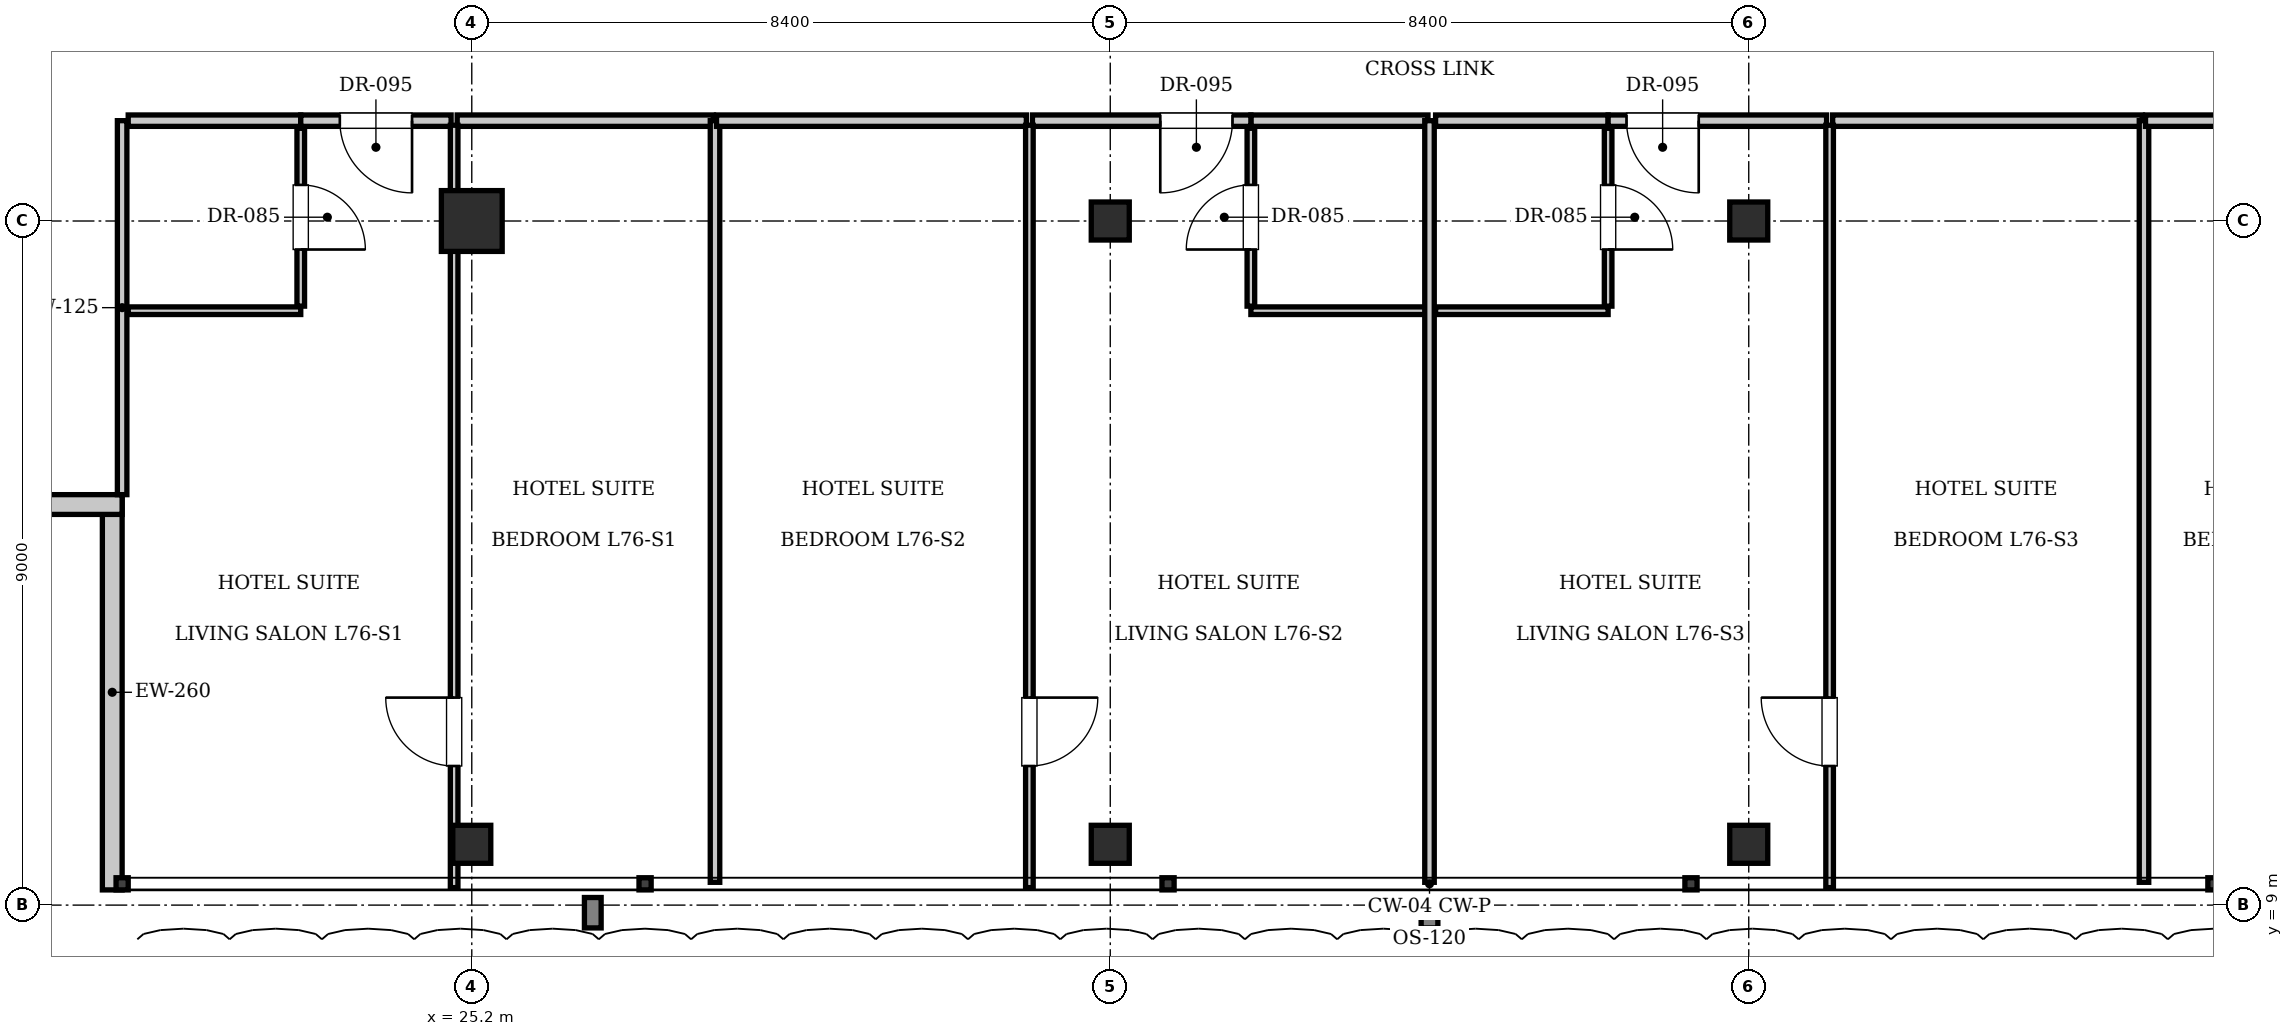
"""IFC4 building model, lengths in metres.
Left out: names, types, materials, properties, quantities, classifications, styles, units other than length and angle.
Written with IfcOpenShell. Run it as: python <this file> out.ifc"""

import sys

from ifc_helpers import new_model, si_unit, direction, frame, frame_2d, origin, origin_2d, place, context, subcontext, project, spatial, rectangle, i_section, extrude, element, fill, save


model = new_model("IFC4")
c1 = context("Model", 3, precision=1e-05, world=origin(), true_north=direction((0.0, 1.0)))
c2 = subcontext(c1, "Body", "Model", "MODEL_VIEW")
j1 = project(units=[si_unit("LENGTHUNIT", "METRE"), si_unit("PLANEANGLEUNIT", "RADIAN")], contexts=[c1])
p1 = place(None, origin())
s1 = spatial("IfcSite", under=j1, at=p1, CompositionType="ELEMENT")
p2 = place(p1, origin())
s2 = spatial("IfcBuilding", under=s1, at=p2, CompositionType="ELEMENT")
p3 = place(p2, frame((0.0, 0.0, 308.7)))
s3 = spatial("IfcBuildingStorey", under=s2, at=p3, CompositionType="ELEMENT", Elevation=308.7)
p4 = place(p3, frame((25.2, 18.0, 0.0), z_axis=(0.0, 0.0, 1.0), x_axis=(1.0, 0.0, 0.0)))
e1 = element("IfcColumn", 1, at=p4, inside=s3, PredefinedType="COLUMN", context=c2, shape_type="SweptSolid", body=[
    extrude(rectangle(XDim=0.8, YDim=0.8, at=origin_2d()), origin(), (0.0, 0.0, 1.0), 3.85),
])
for number, where, z_axis, x_axis in (
    (2, (33.6, 18.0, 0.0), (0.0, 0.0, 1.0), (1.0, 0.0, 0.0)),
    (3, (42.0, 18.0, 0.0), (0.0, 0.0, 1.0), (1.0, 0.0, 0.0)),
    (4, (25.2, 9.8, 0.0), (0.0, 0.0, 1.0), (1.0, 0.0, 0.0)),
    (5, (33.6, 9.8, 0.0), (0.0, 0.0, 1.0), (1.0, 0.0, 0.0)),
    (6, (42.0, 9.8, 0.0), (0.0, 0.0, 1.0), (1.0, 0.0, 0.0)),
):
    element("IfcColumn", number, at=place(p3, frame(where, z_axis=z_axis, x_axis=x_axis)), inside=s3, PredefinedType="COLUMN", context=c2, shape_type="SweptSolid", body=[
        extrude(i_section(OverallWidth=0.5, OverallDepth=0.5, WebThickness=0.022, FlangeThickness=0.032, at=origin_2d()), origin(), (0.0, 0.0, 1.0), 3.85),
    ])
p5 = place(p3, frame((20.47, 9.2, 0.0), z_axis=(0.0, 0.0, 1.0), x_axis=(0.0, 1.0, 0.0)))
e7 = element("IfcWall", 7, at=p5, inside=s3, PredefinedType="SOLIDWALL", context=c2, shape_type="SweptSolid", body=[
    extrude(rectangle(XDim=5.2, YDim=0.26, at=frame_2d((2.6, 0.0))), origin(), (0.0, 0.0, 1.0), 3.61),
])
p6 = place(p3, frame((20.6, 14.27, 0.0), z_axis=(0.0, 0.0, 1.0), x_axis=(-1.0, 0.0, 0.0)))
e8 = element("IfcWall", 8, at=p6, inside=s3, PredefinedType="SOLIDWALL", context=c2, shape_type="SweptSolid", body=[
    extrude(rectangle(XDim=5.2, YDim=0.26, at=frame_2d((2.6, 0.0))), origin(), (0.0, 0.0, 1.0), 3.61),
])
p7 = place(p6, frame((1.6, 0.0, 0.9)))
e9 = element("IfcOpeningElement", 9, at=p7, cuts=e8, PredefinedType="OPENING", context=c2, shape_type="SweptSolid", body=[
    extrude(rectangle(XDim=2.0, YDim=2.2, at=frame_2d((1.0, 1.1))), frame((0.0, 0.14, 0.0), z_axis=(0.0, -1.0, 0.0), x_axis=(1.0, 0.0, 0.0)), (0.0, 0.0, 1.0), 0.28),
])
p8 = place(p3, frame((20.6, 14.4, 0.0), z_axis=(0.0, 0.0, 1.0), x_axis=(0.0, 1.0, 0.0)))
e10 = element("IfcWall", 10, at=p8, inside=s3, PredefinedType="PARTITIONING", context=c2, shape_type="SweptSolid", body=[
    extrude(rectangle(XDim=4.92, YDim=0.125, at=frame_2d((2.46, 0.0))), origin(), (0.0, 0.0, 1.0), 3.61),
])
p9 = place(p3, frame((20.68, 19.32, 0.0), z_axis=(0.0, 0.0, 1.0), x_axis=(1.0, 0.0, 0.0)))
e11 = element("IfcWall", 11, at=p9, inside=s3, PredefinedType="PARTITIONING", context=c2, shape_type="SweptSolid", body=[
    extrude(rectangle(XDim=2.27, YDim=0.15, at=frame_2d((1.135, 0.0))), origin(), (0.0, 0.0, 1.0), 3.61),
])
p10 = place(p3, frame((20.68, 16.82, 0.0), z_axis=(0.0, 0.0, 1.0), x_axis=(1.0, 0.0, 0.0)))
e12 = element("IfcWall", 12, at=p10, inside=s3, PredefinedType="PARTITIONING", context=c2, shape_type="SweptSolid", body=[
    extrude(rectangle(XDim=2.27, YDim=0.1, at=frame_2d((1.135, 0.0))), origin(), (0.0, 0.0, 1.0), 3.61),
])
p11 = place(p3, frame((22.95, 16.88, 0.0), z_axis=(0.0, 0.0, 1.0), x_axis=(0.0, 1.0, 0.0)))
e13 = element("IfcWall", 13, at=p11, inside=s3, PredefinedType="PARTITIONING", context=c2, shape_type="SweptSolid", body=[
    extrude(rectangle(XDim=2.34, YDim=0.1, at=frame_2d((1.17, 0.0))), origin(), (0.0, 0.0, 1.0), 3.61),
])
p12 = place(p11, frame((0.745, 0.0, 0.0)))
e14 = element("IfcOpeningElement", 14, at=p12, cuts=e13, PredefinedType="OPENING", context=c2, shape_type="SweptSolid", body=[
    extrude(rectangle(XDim=0.85, YDim=2.1, at=frame_2d((0.425, 1.05))), frame((0.0, 0.06, 0.0), z_axis=(0.0, -1.0, 0.0), x_axis=(1.0, 0.0, 0.0)), (0.0, 0.0, 1.0), 0.12),
])
p13 = place(p3, frame((22.95, 19.32, 0.0), z_axis=(0.0, 0.0, 1.0), x_axis=(1.0, 0.0, 0.0)))
e15 = element("IfcWall", 15, at=p13, inside=s3, PredefinedType="PARTITIONING", context=c2, shape_type="SweptSolid", body=[
    extrude(rectangle(XDim=1.978, YDim=0.15, at=frame_2d((0.989, 0.0))), origin(), (0.0, 0.0, 1.0), 3.61),
])
p14 = place(p13, frame((0.514, 0.0, 0.0)))
e16 = element("IfcOpeningElement", 16, at=p14, cuts=e15, PredefinedType="OPENING", context=c2, shape_type="SweptSolid", body=[
    extrude(rectangle(XDim=0.95, YDim=2.15, at=frame_2d((0.475, 1.075))), frame((0.0, 0.085, 0.0), z_axis=(0.0, -1.0, 0.0), x_axis=(1.0, 0.0, 0.0)), (0.0, 0.0, 1.0), 0.17),
])
p15 = place(p3, frame((25.008, 19.32, 0.0), z_axis=(0.0, 0.0, 1.0), x_axis=(1.0, 0.0, 0.0)))
e17 = element("IfcWall", 17, at=p15, inside=s3, PredefinedType="PARTITIONING", context=c2, shape_type="SweptSolid", body=[
    extrude(rectangle(XDim=3.372, YDim=0.15, at=frame_2d((1.686, 0.0))), origin(), (0.0, 0.0, 1.0), 3.61),
])
p16 = place(p3, frame((24.968, 9.23, 0.0), z_axis=(0.0, 0.0, 1.0), x_axis=(0.0, 1.0, 0.0)))
e18 = element("IfcWall", 18, at=p16, inside=s3, PredefinedType="PARTITIONING", context=c2, shape_type="SweptSolid", body=[
    extrude(rectangle(XDim=10.03, YDim=0.1, at=frame_2d((5.015, 0.0))), origin(), (0.0, 0.0, 1.0), 3.61),
])
p17 = place(p16, frame((1.6, 0.0, 0.0)))
e19 = element("IfcOpeningElement", 19, at=p17, cuts=e18, PredefinedType="OPENING", context=c2, shape_type="SweptSolid", body=[
    extrude(rectangle(XDim=0.9, YDim=2.1, at=frame_2d((0.45, 1.05))), frame((0.0, 0.06, 0.0), z_axis=(0.0, -1.0, 0.0), x_axis=(1.0, 0.0, 0.0)), (0.0, 0.0, 1.0), 0.12),
])
p18 = place(p3, frame((28.4, 9.3, 0.0), z_axis=(0.0, 0.0, 1.0), x_axis=(0.0, 1.0, 0.0)))
e20 = element("IfcWall", 20, at=p18, inside=s3, PredefinedType="PARTITIONING", context=c2, shape_type="SweptSolid", body=[
    extrude(rectangle(XDim=10.02, YDim=0.125, at=frame_2d((5.01, 0.0))), origin(), (0.0, 0.0, 1.0), 3.61),
])
p19 = place(p3, frame((35.45, 19.32, 0.0), z_axis=(0.0, 0.0, 1.0), x_axis=(1.0, 0.0, 0.0)))
e21 = element("IfcWall", 21, at=p19, inside=s3, PredefinedType="PARTITIONING", context=c2, shape_type="SweptSolid", body=[
    extrude(rectangle(XDim=2.33, YDim=0.15, at=frame_2d((1.165, 0.0))), origin(), (0.0, 0.0, 1.0), 3.61),
])
p20 = place(p3, frame((35.45, 16.82, 0.0), z_axis=(0.0, 0.0, 1.0), x_axis=(1.0, 0.0, 0.0)))
e22 = element("IfcWall", 22, at=p20, inside=s3, PredefinedType="PARTITIONING", context=c2, shape_type="SweptSolid", body=[
    extrude(rectangle(XDim=2.31, YDim=0.1, at=frame_2d((1.155, 0.0))), origin(), (0.0, 0.0, 1.0), 3.61),
])
p21 = place(p3, frame((35.45, 16.88, 0.0), z_axis=(0.0, 0.0, 1.0), x_axis=(0.0, 1.0, 0.0)))
e23 = element("IfcWall", 23, at=p21, inside=s3, PredefinedType="PARTITIONING", context=c2, shape_type="SweptSolid", body=[
    extrude(rectangle(XDim=2.34, YDim=0.1, at=frame_2d((1.17, 0.0))), origin(), (0.0, 0.0, 1.0), 3.61),
])
p22 = place(p21, frame((0.745, 0.0, 0.0)))
e24 = element("IfcOpeningElement", 24, at=p22, cuts=e23, PredefinedType="OPENING", context=c2, shape_type="SweptSolid", body=[
    extrude(rectangle(XDim=0.85, YDim=2.1, at=frame_2d((0.425, 1.05))), frame((0.0, 0.06, 0.0), z_axis=(0.0, -1.0, 0.0), x_axis=(1.0, 0.0, 0.0)), (0.0, 0.0, 1.0), 0.12),
])
p23 = place(p3, frame((28.42, 19.32, 0.0), z_axis=(0.0, 0.0, 1.0), x_axis=(1.0, 0.0, 0.0)))
e25 = element("IfcWall", 25, at=p23, inside=s3, PredefinedType="PARTITIONING", context=c2, shape_type="SweptSolid", body=[
    extrude(rectangle(XDim=4.076, YDim=0.15, at=frame_2d((2.038, 0.0))), origin(), (0.0, 0.0, 1.0), 3.61),
])
p24 = place(p3, frame((32.576, 19.32, 0.0), z_axis=(0.0, 0.0, 1.0), x_axis=(1.0, 0.0, 0.0)))
e26 = element("IfcWall", 26, at=p24, inside=s3, PredefinedType="PARTITIONING", context=c2, shape_type="SweptSolid", body=[
    extrude(rectangle(XDim=2.874, YDim=0.15, at=frame_2d((1.437, 0.0))), origin(), (0.0, 0.0, 1.0), 3.61),
])
p25 = place(p24, frame((1.682, 0.0, 0.0)))
e27 = element("IfcOpeningElement", 27, at=p25, cuts=e26, PredefinedType="OPENING", context=c2, shape_type="SweptSolid", body=[
    extrude(rectangle(XDim=0.95, YDim=2.15, at=frame_2d((0.475, 1.075))), frame((0.0, 0.085, 0.0), z_axis=(0.0, -1.0, 0.0), x_axis=(1.0, 0.0, 0.0)), (0.0, 0.0, 1.0), 0.17),
])
p26 = place(p3, frame((32.536, 9.23, 0.0), z_axis=(0.0, 0.0, 1.0), x_axis=(0.0, 1.0, 0.0)))
e28 = element("IfcWall", 28, at=p26, inside=s3, PredefinedType="PARTITIONING", context=c2, shape_type="SweptSolid", body=[
    extrude(rectangle(XDim=10.03, YDim=0.1, at=frame_2d((5.015, 0.0))), origin(), (0.0, 0.0, 1.0), 3.61),
])
p27 = place(p26, frame((1.6, 0.0, 0.0)))
e29 = element("IfcOpeningElement", 29, at=p27, cuts=e28, PredefinedType="OPENING", context=c2, shape_type="SweptSolid", body=[
    extrude(rectangle(XDim=0.9, YDim=2.1, at=frame_2d((0.45, 1.05))), frame((0.0, 0.06, 0.0), z_axis=(0.0, -1.0, 0.0), x_axis=(1.0, 0.0, 0.0)), (0.0, 0.0, 1.0), 0.12),
])
p28 = place(p3, frame((37.8, 9.3, 0.0), z_axis=(0.0, 0.0, 1.0), x_axis=(0.0, 1.0, 0.0)))
e30 = element("IfcWall", 30, at=p28, inside=s3, PredefinedType="PARTITIONING", context=c2, shape_type="SweptSolid", body=[
    extrude(rectangle(XDim=10.02, YDim=0.125, at=frame_2d((5.01, 0.0))), origin(), (0.0, 0.0, 1.0), 3.255),
])
p29 = place(p3, frame((37.88, 19.32, 0.0), z_axis=(0.0, 0.0, 1.0), x_axis=(1.0, 0.0, 0.0)))
e31 = element("IfcWall", 31, at=p29, inside=s3, PredefinedType="PARTITIONING", context=c2, shape_type="SweptSolid", body=[
    extrude(rectangle(XDim=2.27, YDim=0.15, at=frame_2d((1.135, 0.0))), origin(), (0.0, 0.0, 1.0), 3.61),
])
p30 = place(p3, frame((37.88, 16.82, 0.0), z_axis=(0.0, 0.0, 1.0), x_axis=(1.0, 0.0, 0.0)))
e32 = element("IfcWall", 32, at=p30, inside=s3, PredefinedType="PARTITIONING", context=c2, shape_type="SweptSolid", body=[
    extrude(rectangle(XDim=2.27, YDim=0.1, at=frame_2d((1.135, 0.0))), origin(), (0.0, 0.0, 1.0), 3.61),
])
p31 = place(p3, frame((40.15, 16.88, 0.0), z_axis=(0.0, 0.0, 1.0), x_axis=(0.0, 1.0, 0.0)))
e33 = element("IfcWall", 33, at=p31, inside=s3, PredefinedType="PARTITIONING", context=c2, shape_type="SweptSolid", body=[
    extrude(rectangle(XDim=2.34, YDim=0.1, at=frame_2d((1.17, 0.0))), origin(), (0.0, 0.0, 1.0), 3.61),
])
p32 = place(p31, frame((0.745, 0.0, 0.0)))
e34 = element("IfcOpeningElement", 34, at=p32, cuts=e33, PredefinedType="OPENING", context=c2, shape_type="SweptSolid", body=[
    extrude(rectangle(XDim=0.85, YDim=2.1, at=frame_2d((0.425, 1.05))), frame((0.0, 0.06, 0.0), z_axis=(0.0, -1.0, 0.0), x_axis=(1.0, 0.0, 0.0)), (0.0, 0.0, 1.0), 0.12),
])
p33 = place(p3, frame((40.15, 19.32, 0.0), z_axis=(0.0, 0.0, 1.0), x_axis=(1.0, 0.0, 0.0)))
e35 = element("IfcWall", 35, at=p33, inside=s3, PredefinedType="PARTITIONING", context=c2, shape_type="SweptSolid", body=[
    extrude(rectangle(XDim=2.874, YDim=0.15, at=frame_2d((1.437, 0.0))), origin(), (0.0, 0.0, 1.0), 3.61),
])
p34 = place(p33, frame((0.242, 0.0, 0.0)))
e36 = element("IfcOpeningElement", 36, at=p34, cuts=e35, PredefinedType="OPENING", context=c2, shape_type="SweptSolid", body=[
    extrude(rectangle(XDim=0.95, YDim=2.15, at=frame_2d((0.475, 1.075))), frame((0.0, 0.085, 0.0), z_axis=(0.0, -1.0, 0.0), x_axis=(1.0, 0.0, 0.0)), (0.0, 0.0, 1.0), 0.17),
])
p35 = place(p3, frame((43.104, 19.32, 0.0), z_axis=(0.0, 0.0, 1.0), x_axis=(1.0, 0.0, 0.0)))
e37 = element("IfcWall", 37, at=p35, inside=s3, PredefinedType="PARTITIONING", context=c2, shape_type="SweptSolid", body=[
    extrude(rectangle(XDim=4.076, YDim=0.15, at=frame_2d((2.038, 0.0))), origin(), (0.0, 0.0, 1.0), 3.61),
])
p36 = place(p3, frame((43.064, 9.23, 0.0), z_axis=(0.0, 0.0, 1.0), x_axis=(0.0, 1.0, 0.0)))
e38 = element("IfcWall", 38, at=p36, inside=s3, PredefinedType="PARTITIONING", context=c2, shape_type="SweptSolid", body=[
    extrude(rectangle(XDim=10.03, YDim=0.1, at=frame_2d((5.015, 0.0))), origin(), (0.0, 0.0, 1.0), 3.61),
])
p37 = place(p36, frame((1.6, 0.0, 0.0)))
e39 = element("IfcOpeningElement", 39, at=p37, cuts=e38, PredefinedType="OPENING", context=c2, shape_type="SweptSolid", body=[
    extrude(rectangle(XDim=0.9, YDim=2.1, at=frame_2d((0.45, 1.05))), frame((0.0, 0.06, 0.0), z_axis=(0.0, -1.0, 0.0), x_axis=(1.0, 0.0, 0.0)), (0.0, 0.0, 1.0), 0.12),
])
p38 = place(p3, frame((47.2, 9.3, 0.0), z_axis=(0.0, 0.0, 1.0), x_axis=(0.0, 1.0, 0.0)))
e40 = element("IfcWall", 40, at=p38, inside=s3, PredefinedType="PARTITIONING", context=c2, shape_type="SweptSolid", body=[
    extrude(rectangle(XDim=10.02, YDim=0.125, at=frame_2d((5.01, 0.0))), origin(), (0.0, 0.0, 1.0), 3.61),
])
p39 = place(p3, frame((47.22, 19.32, 0.0), z_axis=(0.0, 0.0, 1.0), x_axis=(1.0, 0.0, 0.0)))
e41 = element("IfcWall", 41, at=p39, inside=s3, PredefinedType="PARTITIONING", context=c2, shape_type="SweptSolid", body=[
    extrude(rectangle(XDim=3.372, YDim=0.15, at=frame_2d((1.686, 0.0))), origin(), (0.0, 0.0, 1.0), 3.61),
])
p40 = place(p12, frame((0.85, 0.0, 0.0), z_axis=(0.0, 0.0, 1.0), x_axis=(-1.0, 0.0, 0.0)))
e42 = element("IfcDoor", 42, at=p40, inside=s3, OperationType="SINGLE_SWING_RIGHT", PredefinedType="DOOR", context=c2, shape_type="SweptSolid", body=[
    extrude(rectangle(XDim=0.85, YDim=2.1, at=frame_2d((0.425, 1.05))), frame((0.0, 0.025, 0.0), z_axis=(0.0, -1.0, 0.0), x_axis=(1.0, 0.0, 0.0)), (0.0, 0.0, 1.0), 0.05),
])
fill(e14, e42)
p41 = place(p14, frame((0.95, 0.0, 0.0), z_axis=(0.0, 0.0, 1.0), x_axis=(-1.0, 0.0, 0.0)))
e43 = element("IfcDoor", 43, at=p41, inside=s3, OperationType="SINGLE_SWING_LEFT", PredefinedType="DOOR", context=c2, shape_type="SweptSolid", body=[
    extrude(rectangle(XDim=0.95, YDim=2.15, at=frame_2d((0.475, 1.075))), frame((0.0, 0.025, 0.0), z_axis=(0.0, -1.0, 0.0), x_axis=(1.0, 0.0, 0.0)), (0.0, 0.0, 1.0), 0.05),
])
fill(e16, e43)
p42 = place(p17, origin())
e44 = element("IfcDoor", 44, at=p42, inside=s3, OperationType="SINGLE_SWING_RIGHT", PredefinedType="DOOR", context=c2, shape_type="SweptSolid", body=[
    extrude(rectangle(XDim=0.9, YDim=2.1, at=frame_2d((0.45, 1.05))), frame((0.0, 0.025, 0.0), z_axis=(0.0, -1.0, 0.0), x_axis=(1.0, 0.0, 0.0)), (0.0, 0.0, 1.0), 0.05),
])
fill(e19, e44)
p43 = place(p22, origin())
e45 = element("IfcDoor", 45, at=p43, inside=s3, OperationType="SINGLE_SWING_LEFT", PredefinedType="DOOR", context=c2, shape_type="SweptSolid", body=[
    extrude(rectangle(XDim=0.85, YDim=2.1, at=frame_2d((0.425, 1.05))), frame((0.0, 0.025, 0.0), z_axis=(0.0, -1.0, 0.0), x_axis=(1.0, 0.0, 0.0)), (0.0, 0.0, 1.0), 0.05),
])
fill(e24, e45)
p44 = place(p25, frame((0.95, 0.0, 0.0), z_axis=(0.0, 0.0, 1.0), x_axis=(-1.0, 0.0, 0.0)))
e46 = element("IfcDoor", 46, at=p44, inside=s3, OperationType="SINGLE_SWING_RIGHT", PredefinedType="DOOR", context=c2, shape_type="SweptSolid", body=[
    extrude(rectangle(XDim=0.95, YDim=2.15, at=frame_2d((0.475, 1.075))), frame((0.0, 0.025, 0.0), z_axis=(0.0, -1.0, 0.0), x_axis=(1.0, 0.0, 0.0)), (0.0, 0.0, 1.0), 0.05),
])
fill(e27, e46)
p45 = place(p27, frame((0.9, 0.0, 0.0), z_axis=(0.0, 0.0, 1.0), x_axis=(-1.0, 0.0, 0.0)))
e47 = element("IfcDoor", 47, at=p45, inside=s3, OperationType="SINGLE_SWING_LEFT", PredefinedType="DOOR", context=c2, shape_type="SweptSolid", body=[
    extrude(rectangle(XDim=0.9, YDim=2.1, at=frame_2d((0.45, 1.05))), frame((0.0, 0.025, 0.0), z_axis=(0.0, -1.0, 0.0), x_axis=(1.0, 0.0, 0.0)), (0.0, 0.0, 1.0), 0.05),
])
fill(e29, e47)
p46 = place(p32, frame((0.85, 0.0, 0.0), z_axis=(0.0, 0.0, 1.0), x_axis=(-1.0, 0.0, 0.0)))
e48 = element("IfcDoor", 48, at=p46, inside=s3, OperationType="SINGLE_SWING_RIGHT", PredefinedType="DOOR", context=c2, shape_type="SweptSolid", body=[
    extrude(rectangle(XDim=0.85, YDim=2.1, at=frame_2d((0.425, 1.05))), frame((0.0, 0.025, 0.0), z_axis=(0.0, -1.0, 0.0), x_axis=(1.0, 0.0, 0.0)), (0.0, 0.0, 1.0), 0.05),
])
fill(e34, e48)
p47 = place(p34, frame((0.95, 0.0, 0.0), z_axis=(0.0, 0.0, 1.0), x_axis=(-1.0, 0.0, 0.0)))
e49 = element("IfcDoor", 49, at=p47, inside=s3, OperationType="SINGLE_SWING_LEFT", PredefinedType="DOOR", context=c2, shape_type="SweptSolid", body=[
    extrude(rectangle(XDim=0.95, YDim=2.15, at=frame_2d((0.475, 1.075))), frame((0.0, 0.025, 0.0), z_axis=(0.0, -1.0, 0.0), x_axis=(1.0, 0.0, 0.0)), (0.0, 0.0, 1.0), 0.05),
])
fill(e36, e49)
p48 = place(p37, origin())
e50 = element("IfcDoor", 50, at=p48, inside=s3, OperationType="SINGLE_SWING_RIGHT", PredefinedType="DOOR", context=c2, shape_type="SweptSolid", body=[
    extrude(rectangle(XDim=0.9, YDim=2.1, at=frame_2d((0.45, 1.05))), frame((0.0, 0.025, 0.0), z_axis=(0.0, -1.0, 0.0), x_axis=(1.0, 0.0, 0.0)), (0.0, 0.0, 1.0), 0.05),
])
fill(e39, e50)
save(model, sys.argv[1])
